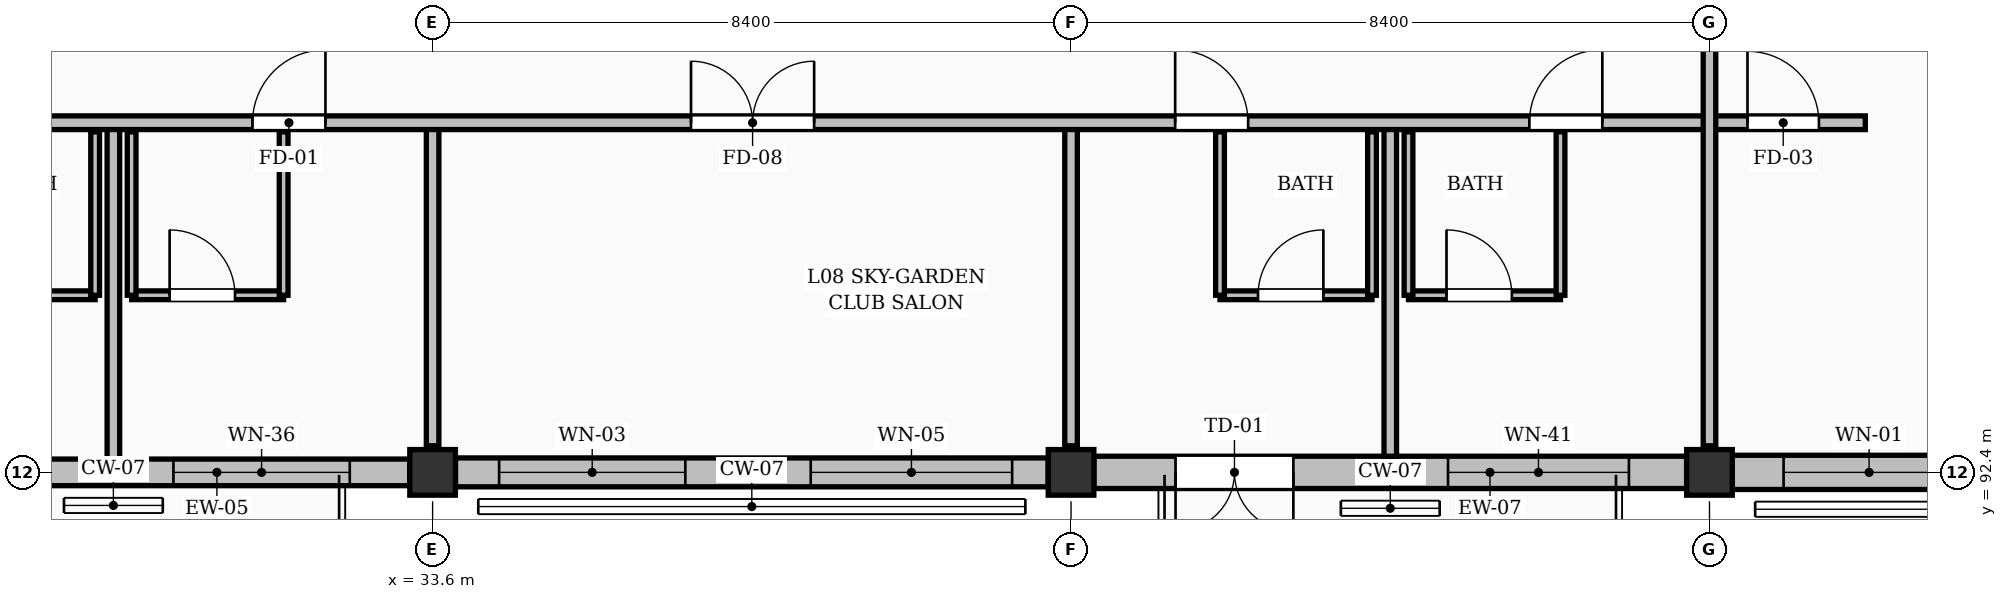
"""IFC4 building model, lengths in metres.
Left out: names, types, materials, properties, quantities, classifications, styles, units other than length and angle.
Written with IfcOpenShell. Run it as: python <this file> out.ifc"""

import sys

from ifc_helpers import new_model, si_unit, direction, frame, frame_2d, origin, origin_2d, place, context, subcontext, project, spatial, rectangle, extrude, element, fill, save


model = new_model("IFC4")
c1 = context("Model", 3, precision=1e-05, world=origin(), true_north=direction((0.0, 1.0)))
c2 = subcontext(c1, "Body", "Model", "MODEL_VIEW")
j1 = project(units=[si_unit("LENGTHUNIT", "METRE"), si_unit("PLANEANGLEUNIT", "RADIAN")], contexts=[c1])
p1 = place(None, origin())
s1 = spatial("IfcSite", under=j1, at=p1, CompositionType="ELEMENT")
p2 = place(p1, origin())
s2 = spatial("IfcBuilding", under=s1, at=p2, CompositionType="ELEMENT")
p3 = place(p2, frame((0.0, 0.0, 28.56)))
s3 = spatial("IfcBuildingStorey", under=s2, at=p3, CompositionType="ELEMENT", Elevation=28.56)
for number, where, z_axis, x_axis in (
    (1, (33.6, 92.4, 0.0), (0.0, 0.0, 1.0), (1.0, 0.0, 0.0)),
    (2, (42.0, 92.4, 0.0), (0.0, 0.0, 1.0), (1.0, 0.0, 0.0)),
    (3, (50.4, 92.4, 0.0), (0.0, 0.0, 1.0), (1.0, 0.0, 0.0)),
):
    element("IfcColumn", number, at=place(p3, frame(where, z_axis=z_axis, x_axis=x_axis)), inside=s3, PredefinedType="COLUMN", context=c2, shape_type="SweptSolid", body=[
        extrude(rectangle(XDim=0.6, YDim=0.6, at=origin_2d()), origin(), (0.0, 0.0, 1.0), 3.36),
    ])
p4 = place(p3, frame((25.501, 92.4, 0.0), z_axis=(0.0, 0.0, 1.0), x_axis=(1.0, 0.0, 0.0)))
e4 = element("IfcWall", 4, at=p4, inside=s3, PredefinedType="SOLIDWALL", context=c2, shape_type="SweptSolid", body=[
    extrude(rectangle(XDim=7.798, YDim=0.35, at=frame_2d((3.899, 0.0))), origin(), (0.0, 0.0, 1.0), 2.494),
])
p5 = place(p4, frame((0.974, 0.0, 0.0)))
e5 = element("IfcOpeningElement", 5, at=p5, cuts=e4, PredefinedType="OPENING", context=c2, shape_type="SweptSolid", body=[
    extrude(rectangle(XDim=1.75, YDim=2.08, at=frame_2d((0.875, 1.04))), frame((0.0, 0.185, 0.0), z_axis=(0.0, -1.0, 0.0), x_axis=(1.0, 0.0, 0.0)), (0.0, 0.0, 1.0), 0.37),
])
p6 = place(p4, frame((4.689, 0.0, 0.25)))
e6 = element("IfcOpeningElement", 6, at=p6, cuts=e4, PredefinedType="OPENING", context=c2, shape_type="SweptSolid", body=[
    extrude(rectangle(XDim=2.32, YDim=1.9, at=frame_2d((1.16, 0.95))), frame((0.0, 0.185, 0.0), z_axis=(0.0, -1.0, 0.0), x_axis=(1.0, 0.0, 0.0)), (0.0, 0.0, 1.0), 0.37),
])
p7 = place(p3, frame((33.901, 92.4, 0.0), z_axis=(0.0, 0.0, 1.0), x_axis=(1.0, 0.0, 0.0)))
e7 = element("IfcWall", 7, at=p7, inside=s3, PredefinedType="SOLIDWALL", context=c2, shape_type="SweptSolid", body=[
    extrude(rectangle(XDim=7.798, YDim=0.38, at=frame_2d((3.899, 0.0))), origin(), (0.0, 0.0, 1.0), 2.494),
])
p8 = place(p7, frame((0.574, 0.0, 0.25)))
e8 = element("IfcOpeningElement", 8, at=p8, cuts=e7, PredefinedType="OPENING", context=c2, shape_type="SweptSolid", body=[
    extrude(rectangle(XDim=2.45, YDim=1.85, at=frame_2d((1.225, 0.925))), frame((0.0, 0.2, 0.0), z_axis=(0.0, -1.0, 0.0), x_axis=(1.0, 0.0, 0.0)), (0.0, 0.0, 1.0), 0.4),
])
p9 = place(p7, frame((4.674, 0.0, 0.25)))
e9 = element("IfcOpeningElement", 9, at=p9, cuts=e7, PredefinedType="OPENING", context=c2, shape_type="SweptSolid", body=[
    extrude(rectangle(XDim=2.65, YDim=1.85, at=frame_2d((1.325, 0.925))), frame((0.0, 0.2, 0.0), z_axis=(0.0, -1.0, 0.0), x_axis=(1.0, 0.0, 0.0)), (0.0, 0.0, 1.0), 0.4),
])
p10 = place(p3, frame((42.301, 92.4, 0.0), z_axis=(0.0, 0.0, 1.0), x_axis=(1.0, 0.0, 0.0)))
e10 = element("IfcWall", 10, at=p10, inside=s3, PredefinedType="SOLIDWALL", context=c2, shape_type="SweptSolid", body=[
    extrude(rectangle(XDim=7.798, YDim=0.425, at=frame_2d((3.899, 0.0))), origin(), (0.0, 0.0, 1.0), 2.494),
])
p11 = place(p10, frame((1.074, 0.0, 0.0)))
e11 = element("IfcOpeningElement", 11, at=p11, cuts=e10, PredefinedType="OPENING", context=c2, shape_type="SweptSolid", body=[
    extrude(rectangle(XDim=1.55, YDim=2.08, at=frame_2d((0.775, 1.04))), frame((0.0, 0.223, 0.0), z_axis=(0.0, -1.0, 0.0), x_axis=(1.0, 0.0, 0.0)), (0.0, 0.0, 1.0), 0.445),
])
p12 = place(p10, frame((4.659, 0.0, 0.25)))
e12 = element("IfcOpeningElement", 12, at=p12, cuts=e10, PredefinedType="OPENING", context=c2, shape_type="SweptSolid", body=[
    extrude(rectangle(XDim=2.38, YDim=2.0, at=frame_2d((1.19, 1.0))), frame((0.0, 0.223, 0.0), z_axis=(0.0, -1.0, 0.0), x_axis=(1.0, 0.0, 0.0)), (0.0, 0.0, 1.0), 0.445),
])
p13 = place(p3, frame((50.701, 92.4, 0.0), z_axis=(0.0, 0.0, 1.0), x_axis=(1.0, 0.0, 0.0)))
e13 = element("IfcWall", 13, at=p13, inside=s3, PredefinedType="SOLIDWALL", context=c2, shape_type="SweptSolid", body=[
    extrude(rectangle(XDim=7.798, YDim=0.45, at=frame_2d((3.899, 0.0))), origin(), (0.0, 0.0, 1.0), 2.494),
])
p14 = place(p13, frame((0.674, 0.0, 0.25)))
e14 = element("IfcOpeningElement", 14, at=p14, cuts=e13, PredefinedType="OPENING", context=c2, shape_type="SweptSolid", body=[
    extrude(rectangle(XDim=2.25, YDim=1.85, at=frame_2d((1.125, 0.925))), frame((0.0, 0.235, 0.0), z_axis=(0.0, -1.0, 0.0), x_axis=(1.0, 0.0, 0.0)), (0.0, 0.0, 1.0), 0.47),
])
p15 = place(p13, frame((4.874, 0.0, 0.25)))
e15 = element("IfcOpeningElement", 15, at=p15, cuts=e13, PredefinedType="OPENING", context=c2, shape_type="SweptSolid", body=[
    extrude(rectangle(XDim=2.25, YDim=1.95, at=frame_2d((1.125, 0.975))), frame((0.0, 0.235, 0.0), z_axis=(0.0, -1.0, 0.0), x_axis=(1.0, 0.0, 0.0)), (0.0, 0.0, 1.0), 0.47),
])
p16 = place(p3, frame((27.16, 94.73, 0.0), z_axis=(0.0, 0.0, 1.0), x_axis=(1.0, 0.0, 0.0)))
e16 = element("IfcWall", 16, at=p16, inside=s3, PredefinedType="PARTITIONING", context=c2, shape_type="SweptSolid", body=[
    extrude(rectangle(XDim=2.0, YDim=0.115, at=frame_2d((1.0, 0.0))), origin(), (0.0, 0.0, 1.0), 3.12),
])
p17 = place(p16, frame((0.5, 0.0, 0.0)))
e17 = element("IfcOpeningElement", 17, at=p17, cuts=e16, PredefinedType="OPENING", context=c2, shape_type="SweptSolid", body=[
    extrude(rectangle(XDim=0.86, YDim=2.05, at=frame_2d((0.43, 1.025))), frame((0.0, 0.067, 0.0), z_axis=(0.0, -1.0, 0.0), x_axis=(1.0, 0.0, 0.0)), (0.0, 0.0, 1.0), 0.135),
])
p18 = place(p3, frame((29.16, 94.73, 0.0), z_axis=(0.0, 0.0, 1.0), x_axis=(0.0, 1.0, 0.0)))
e18 = element("IfcWall", 18, at=p18, inside=s3, PredefinedType="PARTITIONING", context=c2, shape_type="SweptSolid", body=[
    extrude(rectangle(XDim=2.15, YDim=0.115, at=frame_2d((1.075, 0.0))), origin(), (0.0, 0.0, 1.0), 3.12),
])
p19 = place(p3, frame((29.64, 94.73, 0.0), z_axis=(0.0, 0.0, 1.0), x_axis=(1.0, 0.0, 0.0)))
e19 = element("IfcWall", 19, at=p19, inside=s3, PredefinedType="PARTITIONING", context=c2, shape_type="SweptSolid", body=[
    extrude(rectangle(XDim=2.0, YDim=0.115, at=frame_2d((1.0, 0.0))), origin(), (0.0, 0.0, 1.0), 3.12),
])
p20 = place(p19, frame((0.5, 0.0, 0.0)))
e20 = element("IfcOpeningElement", 20, at=p20, cuts=e19, PredefinedType="OPENING", context=c2, shape_type="SweptSolid", body=[
    extrude(rectangle(XDim=0.86, YDim=2.05, at=frame_2d((0.43, 1.025))), frame((0.0, 0.067, 0.0), z_axis=(0.0, -1.0, 0.0), x_axis=(1.0, 0.0, 0.0)), (0.0, 0.0, 1.0), 0.135),
])
for number, where, z_axis, x_axis in (
    (21, (29.64, 94.73, 0.0), (0.0, 0.0, 1.0), (0.0, 1.0, 0.0)),
    (22, (31.64, 94.73, 0.0), (0.0, 0.0, 1.0), (0.0, 1.0, 0.0)),
):
    element("IfcWall", number, at=place(p3, frame(where, z_axis=z_axis, x_axis=x_axis)), inside=s3, PredefinedType="PARTITIONING", context=c2, shape_type="SweptSolid", body=[
        extrude(rectangle(XDim=2.15, YDim=0.115, at=frame_2d((1.075, 0.0))), origin(), (0.0, 0.0, 1.0), 3.12),
    ])
p21 = place(p3, frame((29.4, 92.575, 0.0), z_axis=(0.0, 0.0, 1.0), x_axis=(0.0, 1.0, 0.0)))
e23 = element("IfcWall", 23, at=p21, inside=s3, PredefinedType="PARTITIONING", context=c2, shape_type="SweptSolid", body=[
    extrude(rectangle(XDim=4.425, YDim=0.165, at=frame_2d((2.212, 0.0))), origin(), (0.0, 0.0, 1.0), 3.12),
])
p22 = place(p3, frame((33.6, 92.75, 0.0), z_axis=(0.0, 0.0, 1.0), x_axis=(0.0, 1.0, 0.0)))
e24 = element("IfcWall", 24, at=p22, inside=s3, PredefinedType="PARTITIONING", context=c2, shape_type="SweptSolid", body=[
    extrude(rectangle(XDim=4.25, YDim=0.165, at=frame_2d((2.125, 0.0))), origin(), (0.0, 0.0, 1.0), 2.455),
])
p23 = place(p3, frame((43.96, 94.73, 0.0), z_axis=(0.0, 0.0, 1.0), x_axis=(1.0, 0.0, 0.0)))
e25 = element("IfcWall", 25, at=p23, inside=s3, PredefinedType="PARTITIONING", context=c2, shape_type="SweptSolid", body=[
    extrude(rectangle(XDim=2.0, YDim=0.115, at=frame_2d((1.0, 0.0))), origin(), (0.0, 0.0, 1.0), 3.12),
])
p24 = place(p23, frame((0.5, 0.0, 0.0)))
e26 = element("IfcOpeningElement", 26, at=p24, cuts=e25, PredefinedType="OPENING", context=c2, shape_type="SweptSolid", body=[
    extrude(rectangle(XDim=0.86, YDim=2.05, at=frame_2d((0.43, 1.025))), frame((0.0, 0.067, 0.0), z_axis=(0.0, -1.0, 0.0), x_axis=(1.0, 0.0, 0.0)), (0.0, 0.0, 1.0), 0.135),
])
for number, where, z_axis, x_axis in (
    (27, (43.96, 94.73, 0.0), (0.0, 0.0, 1.0), (0.0, 1.0, 0.0)),
    (28, (45.96, 94.73, 0.0), (0.0, 0.0, 1.0), (0.0, 1.0, 0.0)),
):
    element("IfcWall", number, at=place(p3, frame(where, z_axis=z_axis, x_axis=x_axis)), inside=s3, PredefinedType="PARTITIONING", context=c2, shape_type="SweptSolid", body=[
        extrude(rectangle(XDim=2.15, YDim=0.115, at=frame_2d((1.075, 0.0))), origin(), (0.0, 0.0, 1.0), 3.12),
    ])
p25 = place(p3, frame((46.44, 94.73, 0.0), z_axis=(0.0, 0.0, 1.0), x_axis=(1.0, 0.0, 0.0)))
e29 = element("IfcWall", 29, at=p25, inside=s3, PredefinedType="PARTITIONING", context=c2, shape_type="SweptSolid", body=[
    extrude(rectangle(XDim=2.0, YDim=0.115, at=frame_2d((1.0, 0.0))), origin(), (0.0, 0.0, 1.0), 3.12),
])
p26 = place(p25, frame((0.5, 0.0, 0.0)))
e30 = element("IfcOpeningElement", 30, at=p26, cuts=e29, PredefinedType="OPENING", context=c2, shape_type="SweptSolid", body=[
    extrude(rectangle(XDim=0.86, YDim=2.05, at=frame_2d((0.43, 1.025))), frame((0.0, 0.067, 0.0), z_axis=(0.0, -1.0, 0.0), x_axis=(1.0, 0.0, 0.0)), (0.0, 0.0, 1.0), 0.135),
])
for number, where, z_axis, x_axis in (
    (31, (46.44, 94.73, 0.0), (0.0, 0.0, 1.0), (0.0, 1.0, 0.0)),
    (32, (48.44, 94.73, 0.0), (0.0, 0.0, 1.0), (0.0, 1.0, 0.0)),
):
    element("IfcWall", number, at=place(p3, frame(where, z_axis=z_axis, x_axis=x_axis)), inside=s3, PredefinedType="PARTITIONING", context=c2, shape_type="SweptSolid", body=[
        extrude(rectangle(XDim=2.15, YDim=0.115, at=frame_2d((1.075, 0.0))), origin(), (0.0, 0.0, 1.0), 3.12),
    ])
p27 = place(p3, frame((46.2, 92.613, 0.0), z_axis=(0.0, 0.0, 1.0), x_axis=(0.0, 1.0, 0.0)))
e33 = element("IfcWall", 33, at=p27, inside=s3, PredefinedType="PARTITIONING", context=c2, shape_type="SweptSolid", body=[
    extrude(rectangle(XDim=4.387, YDim=0.165, at=frame_2d((2.194, 0.0))), origin(), (0.0, 0.0, 1.0), 3.12),
])
p28 = place(p3, frame((42.0, 92.75, 0.0), z_axis=(0.0, 0.0, 1.0), x_axis=(0.0, 1.0, 0.0)))
e34 = element("IfcWall", 34, at=p28, inside=s3, PredefinedType="PARTITIONING", context=c2, shape_type="SweptSolid", body=[
    extrude(rectangle(XDim=4.25, YDim=0.165, at=frame_2d((2.125, 0.0))), origin(), (0.0, 0.0, 1.0), 2.455),
])
p29 = place(p3, frame((8.55, 97.0, 0.0), z_axis=(0.0, 0.0, 1.0), x_axis=(1.0, 0.0, 0.0)))
e35 = element("IfcWall", 35, at=p29, inside=s3, PredefinedType="PARTITIONING", context=c2, shape_type="SweptSolid", body=[
    extrude(rectangle(XDim=41.85, YDim=0.18, at=frame_2d((20.925, 0.0))), origin(), (0.0, 0.0, 1.0), 3.12),
])
p30 = place(p29, frame((1.22, 0.0, 0.0)))
e36 = element("IfcOpeningElement", 36, at=p30, cuts=e35, PredefinedType="OPENING", context=c2, shape_type="SweptSolid", body=[
    extrude(rectangle(XDim=0.96, YDim=2.15, at=frame_2d((0.48, 1.075))), frame((0.0, 0.1, 0.0), z_axis=(0.0, -1.0, 0.0), x_axis=(1.0, 0.0, 0.0)), (0.0, 0.0, 1.0), 0.2),
])
p31 = place(p29, frame((5.88, 0.0, 0.0)))
e37 = element("IfcOpeningElement", 37, at=p31, cuts=e35, PredefinedType="OPENING", context=c2, shape_type="SweptSolid", body=[
    extrude(rectangle(XDim=0.96, YDim=2.15, at=frame_2d((0.48, 1.075))), frame((0.0, 0.1, 0.0), z_axis=(0.0, -1.0, 0.0), x_axis=(1.0, 0.0, 0.0)), (0.0, 0.0, 1.0), 0.2),
])
p32 = place(p29, frame((9.62, 0.0, 0.0)))
e38 = element("IfcOpeningElement", 38, at=p32, cuts=e35, PredefinedType="OPENING", context=c2, shape_type="SweptSolid", body=[
    extrude(rectangle(XDim=0.96, YDim=2.15, at=frame_2d((0.48, 1.075))), frame((0.0, 0.1, 0.0), z_axis=(0.0, -1.0, 0.0), x_axis=(1.0, 0.0, 0.0)), (0.0, 0.0, 1.0), 0.2),
])
p33 = place(p29, frame((14.28, 0.0, 0.0)))
e39 = element("IfcOpeningElement", 39, at=p33, cuts=e35, PredefinedType="OPENING", context=c2, shape_type="SweptSolid", body=[
    extrude(rectangle(XDim=0.96, YDim=2.15, at=frame_2d((0.48, 1.075))), frame((0.0, 0.1, 0.0), z_axis=(0.0, -1.0, 0.0), x_axis=(1.0, 0.0, 0.0)), (0.0, 0.0, 1.0), 0.2),
])
p34 = place(p29, frame((18.02, 0.0, 0.0)))
e40 = element("IfcOpeningElement", 40, at=p34, cuts=e35, PredefinedType="OPENING", context=c2, shape_type="SweptSolid", body=[
    extrude(rectangle(XDim=0.96, YDim=2.15, at=frame_2d((0.48, 1.075))), frame((0.0, 0.1, 0.0), z_axis=(0.0, -1.0, 0.0), x_axis=(1.0, 0.0, 0.0)), (0.0, 0.0, 1.0), 0.2),
])
p35 = place(p29, frame((22.68, 0.0, 0.0)))
e41 = element("IfcOpeningElement", 41, at=p35, cuts=e35, PredefinedType="OPENING", context=c2, shape_type="SweptSolid", body=[
    extrude(rectangle(XDim=0.96, YDim=2.15, at=frame_2d((0.48, 1.075))), frame((0.0, 0.1, 0.0), z_axis=(0.0, -1.0, 0.0), x_axis=(1.0, 0.0, 0.0)), (0.0, 0.0, 1.0), 0.2),
])
p36 = place(p29, frame((28.45, 0.0, 0.0)))
e42 = element("IfcOpeningElement", 42, at=p36, cuts=e35, PredefinedType="OPENING", context=c2, shape_type="SweptSolid", body=[
    extrude(rectangle(XDim=1.62, YDim=2.2, at=frame_2d((0.81, 1.1))), frame((0.0, 0.1, 0.0), z_axis=(0.0, -1.0, 0.0), x_axis=(1.0, 0.0, 0.0)), (0.0, 0.0, 1.0), 0.2),
])
p37 = place(p29, frame((34.82, 0.0, 0.0)))
e43 = element("IfcOpeningElement", 43, at=p37, cuts=e35, PredefinedType="OPENING", context=c2, shape_type="SweptSolid", body=[
    extrude(rectangle(XDim=0.96, YDim=2.15, at=frame_2d((0.48, 1.075))), frame((0.0, 0.1, 0.0), z_axis=(0.0, -1.0, 0.0), x_axis=(1.0, 0.0, 0.0)), (0.0, 0.0, 1.0), 0.2),
])
p38 = place(p29, frame((39.48, 0.0, 0.0)))
e44 = element("IfcOpeningElement", 44, at=p38, cuts=e35, PredefinedType="OPENING", context=c2, shape_type="SweptSolid", body=[
    extrude(rectangle(XDim=0.96, YDim=2.15, at=frame_2d((0.48, 1.075))), frame((0.0, 0.1, 0.0), z_axis=(0.0, -1.0, 0.0), x_axis=(1.0, 0.0, 0.0)), (0.0, 0.0, 1.0), 0.2),
])
p39 = place(p3, frame((50.4, 97.0, 0.0), z_axis=(0.0, 0.0, 1.0), x_axis=(1.0, 0.0, 0.0)))
e45 = element("IfcWall", 45, at=p39, inside=s3, PredefinedType="PARTITIONING", context=c2, shape_type="SweptSolid", body=[
    extrude(rectangle(XDim=2.05, YDim=0.18, at=frame_2d((1.025, 0.0))), origin(), (0.0, 0.0, 1.0), 3.12),
])
p40 = place(p39, frame((0.5, 0.0, 0.0)))
e46 = element("IfcOpeningElement", 46, at=p40, cuts=e45, PredefinedType="OPENING", context=c2, shape_type="SweptSolid", body=[
    extrude(rectangle(XDim=0.94, YDim=2.1, at=frame_2d((0.47, 1.05))), frame((0.0, 0.1, 0.0), z_axis=(0.0, -1.0, 0.0), x_axis=(1.0, 0.0, 0.0)), (0.0, 0.0, 1.0), 0.2),
])
p41 = place(p3, frame((50.4, 92.75, 0.0), z_axis=(0.0, 0.0, 1.0), x_axis=(0.0, 1.0, 0.0)))
e47 = element("IfcWall", 47, at=p41, inside=s3, PredefinedType="PARTITIONING", context=c2, shape_type="SweptSolid", body=[
    extrude(rectangle(XDim=12.35, YDim=0.165, at=frame_2d((6.175, 0.0))), origin(), (0.0, 0.0, 1.0), 2.455),
])
p42 = place(p6, origin())
e48 = element("IfcWindow", 48, at=p42, inside=s3, PartitioningType="DOUBLE_PANEL_VERTICAL", PredefinedType="WINDOW", context=c2, shape_type="SweptSolid", body=[
    extrude(rectangle(XDim=2.32, YDim=1.9, at=frame_2d((1.16, 0.95))), frame((0.0, 0.03, 0.0), z_axis=(0.0, -1.0, 0.0), x_axis=(1.0, 0.0, 0.0)), (0.0, 0.0, 1.0), 0.06),
])
fill(e6, e48)
p43 = place(p8, origin())
e49 = element("IfcWindow", 49, at=p43, inside=s3, PartitioningType="DOUBLE_PANEL_VERTICAL", PredefinedType="WINDOW", context=c2, shape_type="SweptSolid", body=[
    extrude(rectangle(XDim=2.45, YDim=1.85, at=frame_2d((1.225, 0.925))), frame((0.0, 0.03, 0.0), z_axis=(0.0, -1.0, 0.0), x_axis=(1.0, 0.0, 0.0)), (0.0, 0.0, 1.0), 0.06),
])
fill(e8, e49)
p44 = place(p9, origin())
e50 = element("IfcWindow", 50, at=p44, inside=s3, PartitioningType="DOUBLE_PANEL_VERTICAL", PredefinedType="WINDOW", context=c2, shape_type="SweptSolid", body=[
    extrude(rectangle(XDim=2.65, YDim=1.85, at=frame_2d((1.325, 0.925))), frame((0.0, 0.03, 0.0), z_axis=(0.0, -1.0, 0.0), x_axis=(1.0, 0.0, 0.0)), (0.0, 0.0, 1.0), 0.06),
])
fill(e9, e50)
p45 = place(p11, frame((1.55, 0.0, 0.0), z_axis=(0.0, 0.0, 1.0), x_axis=(-1.0, 0.0, 0.0)))
e51 = element("IfcDoor", 51, at=p45, inside=s3, OperationType="DOUBLE_DOOR_SINGLE_SWING", PredefinedType="DOOR", context=c2, shape_type="SweptSolid", body=[
    extrude(rectangle(XDim=1.55, YDim=2.08, at=frame_2d((0.775, 1.04))), frame((0.0, 0.025, 0.0), z_axis=(0.0, -1.0, 0.0), x_axis=(1.0, 0.0, 0.0)), (0.0, 0.0, 1.0), 0.05),
])
fill(e11, e51)
p46 = place(p12, origin())
e52 = element("IfcWindow", 52, at=p46, inside=s3, PartitioningType="DOUBLE_PANEL_VERTICAL", PredefinedType="WINDOW", context=c2, shape_type="SweptSolid", body=[
    extrude(rectangle(XDim=2.38, YDim=2.0, at=frame_2d((1.19, 1.0))), frame((0.0, 0.03, 0.0), z_axis=(0.0, -1.0, 0.0), x_axis=(1.0, 0.0, 0.0)), (0.0, 0.0, 1.0), 0.06),
])
fill(e12, e52)
p47 = place(p14, origin())
e53 = element("IfcWindow", 53, at=p47, inside=s3, PartitioningType="DOUBLE_PANEL_VERTICAL", PredefinedType="WINDOW", context=c2, shape_type="SweptSolid", body=[
    extrude(rectangle(XDim=2.25, YDim=1.85, at=frame_2d((1.125, 0.925))), frame((0.0, 0.03, 0.0), z_axis=(0.0, -1.0, 0.0), x_axis=(1.0, 0.0, 0.0)), (0.0, 0.0, 1.0), 0.06),
])
fill(e14, e53)
p48 = place(p20, origin())
e54 = element("IfcDoor", 54, at=p48, inside=s3, OperationType="SINGLE_SWING_LEFT", PredefinedType="DOOR", context=c2, shape_type="SweptSolid", body=[
    extrude(rectangle(XDim=0.86, YDim=2.05, at=frame_2d((0.43, 1.025))), frame((0.0, 0.025, 0.0), z_axis=(0.0, -1.0, 0.0), x_axis=(1.0, 0.0, 0.0)), (0.0, 0.0, 1.0), 0.05),
])
fill(e20, e54)
p49 = place(p24, origin())
e55 = element("IfcDoor", 55, at=p49, inside=s3, OperationType="SINGLE_SWING_RIGHT", PredefinedType="DOOR", context=c2, shape_type="SweptSolid", body=[
    extrude(rectangle(XDim=0.86, YDim=2.05, at=frame_2d((0.43, 1.025))), frame((0.0, 0.025, 0.0), z_axis=(0.0, -1.0, 0.0), x_axis=(1.0, 0.0, 0.0)), (0.0, 0.0, 1.0), 0.05),
])
fill(e26, e55)
p50 = place(p26, origin())
e56 = element("IfcDoor", 56, at=p50, inside=s3, OperationType="SINGLE_SWING_LEFT", PredefinedType="DOOR", context=c2, shape_type="SweptSolid", body=[
    extrude(rectangle(XDim=0.86, YDim=2.05, at=frame_2d((0.43, 1.025))), frame((0.0, 0.025, 0.0), z_axis=(0.0, -1.0, 0.0), x_axis=(1.0, 0.0, 0.0)), (0.0, 0.0, 1.0), 0.05),
])
fill(e30, e56)
p51 = place(p35, origin())
e57 = element("IfcDoor", 57, at=p51, inside=s3, OperationType="SINGLE_SWING_RIGHT", PredefinedType="DOOR", context=c2, shape_type="SweptSolid", body=[
    extrude(rectangle(XDim=0.96, YDim=2.15, at=frame_2d((0.48, 1.075))), frame((0.0, 0.025, 0.0), z_axis=(0.0, -1.0, 0.0), x_axis=(1.0, 0.0, 0.0)), (0.0, 0.0, 1.0), 0.05),
])
fill(e41, e57)
p52 = place(p36, origin())
e58 = element("IfcDoor", 58, at=p52, inside=s3, OperationType="DOUBLE_DOOR_SINGLE_SWING", PredefinedType="DOOR", context=c2, shape_type="SweptSolid", body=[
    extrude(rectangle(XDim=1.62, YDim=2.2, at=frame_2d((0.81, 1.1))), frame((0.0, 0.025, 0.0), z_axis=(0.0, -1.0, 0.0), x_axis=(1.0, 0.0, 0.0)), (0.0, 0.0, 1.0), 0.05),
])
fill(e42, e58)
p53 = place(p37, origin())
e59 = element("IfcDoor", 59, at=p53, inside=s3, OperationType="SINGLE_SWING_LEFT", PredefinedType="DOOR", context=c2, shape_type="SweptSolid", body=[
    extrude(rectangle(XDim=0.96, YDim=2.15, at=frame_2d((0.48, 1.075))), frame((0.0, 0.025, 0.0), z_axis=(0.0, -1.0, 0.0), x_axis=(1.0, 0.0, 0.0)), (0.0, 0.0, 1.0), 0.05),
])
fill(e43, e59)
p54 = place(p38, origin())
e60 = element("IfcDoor", 60, at=p54, inside=s3, OperationType="SINGLE_SWING_RIGHT", PredefinedType="DOOR", context=c2, shape_type="SweptSolid", body=[
    extrude(rectangle(XDim=0.96, YDim=2.15, at=frame_2d((0.48, 1.075))), frame((0.0, 0.025, 0.0), z_axis=(0.0, -1.0, 0.0), x_axis=(1.0, 0.0, 0.0)), (0.0, 0.0, 1.0), 0.05),
])
fill(e44, e60)
p55 = place(p40, origin())
e61 = element("IfcDoor", 61, at=p55, inside=s3, OperationType="SINGLE_SWING_LEFT", PredefinedType="DOOR", context=c2, shape_type="SweptSolid", body=[
    extrude(rectangle(XDim=0.94, YDim=2.1, at=frame_2d((0.47, 1.05))), frame((0.0, 0.025, 0.0), z_axis=(0.0, -1.0, 0.0), x_axis=(1.0, 0.0, 0.0)), (0.0, 0.0, 1.0), 0.05),
])
fill(e46, e61)
save(model, sys.argv[1])
